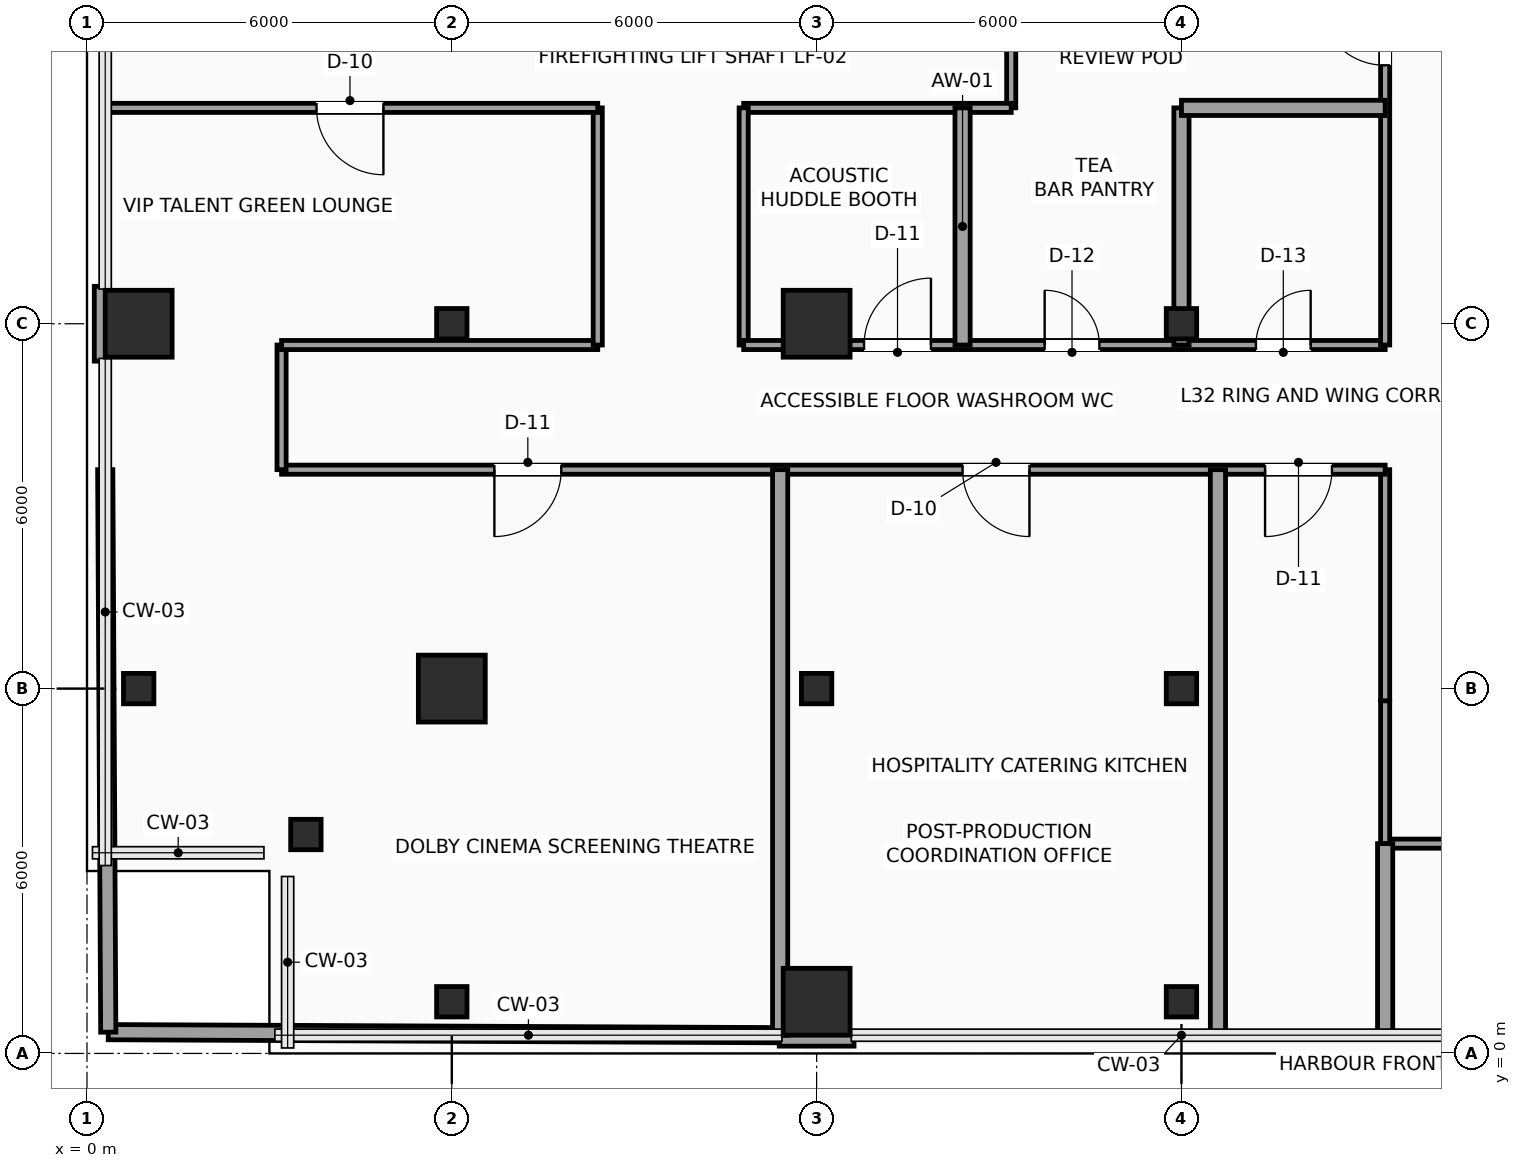
"""IFC4 building model, lengths in metres.
Left out: names, types, materials, properties, quantities, classifications, styles, units other than length and angle.
Written with IfcOpenShell. Run it as: python <this file> out.ifc"""

import sys

from ifc_helpers import new_model, si_unit, direction, frame, frame_2d, origin, origin_2d, place, context, subcontext, project, spatial, rectangle, hollow_rectangle, extrude, element, fill, save


model = new_model("IFC4")
c1 = context("Model", 3, precision=1e-05, world=origin(), true_north=direction((0.0, 1.0)))
c2 = subcontext(c1, "Body", "Model", "MODEL_VIEW")
j1 = project(units=[si_unit("LENGTHUNIT", "METRE"), si_unit("PLANEANGLEUNIT", "RADIAN")], contexts=[c1])
p1 = place(None, origin())
s1 = spatial("IfcSite", under=j1, at=p1, CompositionType="ELEMENT")
p2 = place(p1, origin())
s2 = spatial("IfcBuilding", under=s1, at=p2, CompositionType="ELEMENT")
p3 = place(p2, frame((0.0, 0.0, 134.4)))
s3 = spatial("IfcBuildingStorey", under=s2, at=p3, CompositionType="ELEMENT", Elevation=134.4)
for number, where, z_axis, x_axis in (
    (1, (3.6, 3.6, 0.0), (0.0, 0.0, 1.0), (1.0, 0.0, 0.0)),
    (2, (0.85, 6.0, 0.0), (0.0, 0.0, 1.0), (1.0, 0.0, 0.0)),
):
    element("IfcColumn", number, at=place(p3, frame(where, z_axis=z_axis, x_axis=x_axis)), inside=s3, PredefinedType="COLUMN", context=c2, shape_type="SweptSolid", body=[
        extrude(hollow_rectangle(XDim=0.5, YDim=0.5, WallThickness=0.025, InnerFilletRadius=0.025, OuterFilletRadius=0.04, at=origin_2d()), origin(), (0.0, 0.0, 1.0), 3.75),
    ])
p4 = place(p3, frame((0.85, 12.0, 0.0), z_axis=(0.0, 0.0, 1.0), x_axis=(1.0, 0.0, 0.0)))
e3 = element("IfcColumn", 3, at=p4, inside=s3, PredefinedType="COLUMN", context=c2, shape_type="SweptSolid", body=[
    extrude(rectangle(XDim=1.1, YDim=1.1, at=origin_2d()), origin(), (0.0, 0.0, 1.0), 3.75),
])
p5 = place(p3, frame((6.0, 0.85, 0.0), z_axis=(0.0, 0.0, 1.0), x_axis=(1.0, 0.0, 0.0)))
e4 = element("IfcColumn", 4, at=p5, inside=s3, PredefinedType="COLUMN", context=c2, shape_type="SweptSolid", body=[
    extrude(hollow_rectangle(XDim=0.5, YDim=0.5, WallThickness=0.025, InnerFilletRadius=0.025, OuterFilletRadius=0.04, at=origin_2d()), origin(), (0.0, 0.0, 1.0), 3.75),
])
p6 = place(p3, frame((6.0, 6.0, 0.0), z_axis=(0.0, 0.0, 1.0), x_axis=(1.0, 0.0, 0.0)))
e5 = element("IfcColumn", 5, at=p6, inside=s3, PredefinedType="COLUMN", context=c2, shape_type="SweptSolid", body=[
    extrude(rectangle(XDim=1.1, YDim=1.1, at=origin_2d()), origin(), (0.0, 0.0, 1.0), 3.75),
])
p7 = place(p3, frame((6.0, 12.0, 0.0), z_axis=(0.0, 0.0, 1.0), x_axis=(1.0, 0.0, 0.0)))
e6 = element("IfcColumn", 6, at=p7, inside=s3, PredefinedType="COLUMN", context=c2, shape_type="SweptSolid", body=[
    extrude(hollow_rectangle(XDim=0.5, YDim=0.5, WallThickness=0.025, InnerFilletRadius=0.025, OuterFilletRadius=0.04, at=origin_2d()), origin(), (0.0, 0.0, 1.0), 3.75),
])
p8 = place(p3, frame((12.0, 0.85, 0.0), z_axis=(0.0, 0.0, 1.0), x_axis=(1.0, 0.0, 0.0)))
e7 = element("IfcColumn", 7, at=p8, inside=s3, PredefinedType="COLUMN", context=c2, shape_type="SweptSolid", body=[
    extrude(rectangle(XDim=1.1, YDim=1.1, at=origin_2d()), origin(), (0.0, 0.0, 1.0), 3.75),
])
p9 = place(p3, frame((12.0, 6.0, 0.0), z_axis=(0.0, 0.0, 1.0), x_axis=(1.0, 0.0, 0.0)))
e8 = element("IfcColumn", 8, at=p9, inside=s3, PredefinedType="COLUMN", context=c2, shape_type="SweptSolid", body=[
    extrude(hollow_rectangle(XDim=0.5, YDim=0.5, WallThickness=0.025, InnerFilletRadius=0.025, OuterFilletRadius=0.04, at=origin_2d()), origin(), (0.0, 0.0, 1.0), 3.75),
])
p10 = place(p3, frame((12.0, 12.0, 0.0), z_axis=(0.0, 0.0, 1.0), x_axis=(1.0, 0.0, 0.0)))
e9 = element("IfcColumn", 9, at=p10, inside=s3, PredefinedType="COLUMN", context=c2, shape_type="SweptSolid", body=[
    extrude(rectangle(XDim=1.1, YDim=1.1, at=origin_2d()), origin(), (0.0, 0.0, 1.0), 3.75),
])
for number, where, z_axis, x_axis in (
    (10, (18.0, 0.85, 0.0), (0.0, 0.0, 1.0), (1.0, 0.0, 0.0)),
    (11, (18.0, 6.0, 0.0), (0.0, 0.0, 1.0), (1.0, 0.0, 0.0)),
    (12, (18.0, 12.0, 0.0), (0.0, 0.0, 1.0), (1.0, 0.0, 0.0)),
):
    element("IfcColumn", number, at=place(p3, frame(where, z_axis=z_axis, x_axis=x_axis)), inside=s3, PredefinedType="COLUMN", context=c2, shape_type="SweptSolid", body=[
        extrude(hollow_rectangle(XDim=0.5, YDim=0.5, WallThickness=0.025, InnerFilletRadius=0.025, OuterFilletRadius=0.04, at=origin_2d()), origin(), (0.0, 0.0, 1.0), 3.75),
    ])
for number, where, z_axis, x_axis in (
    (13, (0.24, 11.385, 0.0), (0.0, 0.0, 1.0), (0.0, 1.0, 0.0)),
    (14, (12.615, 0.24, 0.0), (0.0, 0.0, 1.0), (-1.0, 0.0, 0.0)),
):
    element("IfcWall", number, at=place(p3, frame(where, z_axis=z_axis, x_axis=x_axis)), inside=s3, PredefinedType="SOLIDWALL", context=c2, shape_type="SweptSolid", body=[
        extrude(rectangle(XDim=1.23, YDim=0.24, at=frame_2d((0.615, 0.0))), origin(), (0.0, 0.0, 1.0), 3.525),
    ])
p11 = place(p3, frame((23.95, 3.45, 0.0), z_axis=(0.0, 0.0, 1.0), x_axis=(-1.0, 0.0, 0.0)))
e15 = element("IfcWall", 15, at=p11, inside=s3, PredefinedType="PARTITIONING", context=c2, shape_type="SweptSolid", body=[
    extrude(rectangle(XDim=2.6, YDim=0.15, at=frame_2d((1.3, 0.0))), origin(), (0.0, 0.0, 1.0), 3.067),
])
p12 = place(p3, frame((21.35, 3.45, 0.0), z_axis=(0.0, 0.0, 1.0), x_axis=(0.0, 1.0, 0.0)))
e16 = element("IfcWall", 16, at=p12, inside=s3, PredefinedType="PARTITIONING", context=c2, shape_type="SweptSolid", body=[
    extrude(rectangle(XDim=2.35, YDim=0.15, at=frame_2d((1.175, 0.0))), origin(), (0.0, 0.0, 1.0), 3.525),
])
p13 = place(p3, frame((21.35, 5.8, 0.0), z_axis=(0.0, 0.0, 1.0), x_axis=(0.0, 1.0, 0.0)))
e17 = element("IfcWall", 17, at=p13, inside=s3, PredefinedType="PARTITIONING", context=c2, shape_type="SweptSolid", body=[
    extrude(rectangle(XDim=3.8, YDim=0.15, at=frame_2d((1.9, 0.0))), origin(), (0.0, 0.0, 1.0), 3.525),
])
p14 = place(p3, frame((21.35, 9.6, 0.0), z_axis=(0.0, 0.0, 1.0), x_axis=(-1.0, 0.0, 0.0)))
e18 = element("IfcWall", 18, at=p14, inside=s3, PredefinedType="PARTITIONING", context=c2, shape_type="SweptSolid", body=[
    extrude(rectangle(XDim=18.15, YDim=0.15, at=frame_2d((9.075, 0.0))), origin(), (0.0, 0.0, 1.0), 3.525),
])
p15 = place(p14, frame((13.55, 0.0, 0.0)))
e19 = element("IfcOpeningElement", 19, at=p15, cuts=e18, PredefinedType="OPENING", context=c2, shape_type="SweptSolid", body=[
    extrude(rectangle(XDim=1.1, YDim=2.25, at=frame_2d((0.55, 1.125))), frame((0.0, 0.085, 0.0), z_axis=(0.0, -1.0, 0.0), x_axis=(1.0, 0.0, 0.0)), (0.0, 0.0, 1.0), 0.17),
])
p16 = place(p14, frame((5.85, 0.0, 0.0)))
e20 = element("IfcOpeningElement", 20, at=p16, cuts=e18, PredefinedType="OPENING", context=c2, shape_type="SweptSolid", body=[
    extrude(rectangle(XDim=1.1, YDim=2.25, at=frame_2d((0.55, 1.125))), frame((0.0, 0.085, 0.0), z_axis=(0.0, -1.0, 0.0), x_axis=(1.0, 0.0, 0.0)), (0.0, 0.0, 1.0), 0.17),
])
p17 = place(p14, frame((0.875, 0.0, 0.0)))
e21 = element("IfcOpeningElement", 21, at=p17, cuts=e18, PredefinedType="OPENING", context=c2, shape_type="SweptSolid", body=[
    extrude(rectangle(XDim=1.1, YDim=2.25, at=frame_2d((0.55, 1.125))), frame((0.0, 0.085, 0.0), z_axis=(0.0, -1.0, 0.0), x_axis=(1.0, 0.0, 0.0)), (0.0, 0.0, 1.0), 0.17),
])
p18 = place(p3, frame((3.2, 9.6, 0.0), z_axis=(0.0, 0.0, 1.0), x_axis=(0.0, 1.0, 0.0)))
e22 = element("IfcWall", 22, at=p18, inside=s3, PredefinedType="PARTITIONING", context=c2, shape_type="SweptSolid", body=[
    extrude(rectangle(XDim=2.05, YDim=0.15, at=frame_2d((1.025, 0.0))), origin(), (0.0, 0.0, 1.0), 3.525),
])
p19 = place(p3, frame((3.2, 11.65, 0.0), z_axis=(0.0, 0.0, 1.0), x_axis=(1.0, 0.0, 0.0)))
e23 = element("IfcWall", 23, at=p19, inside=s3, PredefinedType="PARTITIONING", context=c2, shape_type="SweptSolid", body=[
    extrude(rectangle(XDim=5.2, YDim=0.15, at=frame_2d((2.6, 0.0))), origin(), (0.0, 0.0, 1.0), 3.525),
])
p20 = place(p3, frame((8.4, 11.65, 0.0), z_axis=(0.0, 0.0, 1.0), x_axis=(0.0, 1.0, 0.0)))
e24 = element("IfcWall", 24, at=p20, inside=s3, PredefinedType="PARTITIONING", context=c2, shape_type="SweptSolid", body=[
    extrude(rectangle(XDim=3.9, YDim=0.15, at=frame_2d((1.95, 0.0))), origin(), (0.0, 0.0, 1.0), 3.525),
])
p21 = place(p3, frame((8.4, 15.55, 0.0), z_axis=(0.0, 0.0, 1.0), x_axis=(-1.0, 0.0, 0.0)))
e25 = element("IfcWall", 25, at=p21, inside=s3, PredefinedType="PARTITIONING", context=c2, shape_type="SweptSolid", body=[
    extrude(rectangle(XDim=8.1, YDim=0.15, at=frame_2d((4.05, 0.0))), origin(), (0.0, 0.0, 1.0), 3.525),
])
p22 = place(p21, frame((3.525, 0.0, 0.0)))
e26 = element("IfcOpeningElement", 26, at=p22, cuts=e25, PredefinedType="OPENING", context=c2, shape_type="SweptSolid", body=[
    extrude(rectangle(XDim=1.1, YDim=2.25, at=frame_2d((0.55, 1.125))), frame((0.0, 0.085, 0.0), z_axis=(0.0, -1.0, 0.0), x_axis=(1.0, 0.0, 0.0)), (0.0, 0.0, 1.0), 0.17),
])
p23 = place(p3, frame((15.2, 17.95, 0.0), z_axis=(0.0, 0.0, 1.0), x_axis=(0.0, -1.0, 0.0)))
e27 = element("IfcWall", 27, at=p23, inside=s3, PredefinedType="PARTITIONING", context=c2, shape_type="SweptSolid", body=[
    extrude(rectangle(XDim=2.4, YDim=0.15, at=frame_2d((1.2, 0.0))), origin(), (0.0, 0.0, 1.0), 3.525),
])
p24 = place(p3, frame((15.2, 15.55, 0.0), z_axis=(0.0, 0.0, 1.0), x_axis=(-1.0, 0.0, 0.0)))
e28 = element("IfcWall", 28, at=p24, inside=s3, PredefinedType="PARTITIONING", context=c2, shape_type="SweptSolid", body=[
    extrude(rectangle(XDim=4.4, YDim=0.15, at=frame_2d((2.2, 0.0))), origin(), (0.0, 0.0, 1.0), 3.525),
])
p25 = place(p3, frame((10.8, 15.55, 0.0), z_axis=(0.0, 0.0, 1.0), x_axis=(0.0, -1.0, 0.0)))
e29 = element("IfcWall", 29, at=p25, inside=s3, PredefinedType="PARTITIONING", context=c2, shape_type="SweptSolid", body=[
    extrude(rectangle(XDim=3.9, YDim=0.15, at=frame_2d((1.95, 0.0))), origin(), (0.0, 0.0, 1.0), 3.525),
])
p26 = place(p3, frame((10.8, 11.65, 0.0), z_axis=(0.0, 0.0, 1.0), x_axis=(1.0, 0.0, 0.0)))
e30 = element("IfcWall", 30, at=p26, inside=s3, PredefinedType="PARTITIONING", context=c2, shape_type="SweptSolid", body=[
    extrude(rectangle(XDim=10.55, YDim=0.15, at=frame_2d((5.275, 0.0))), origin(), (0.0, 0.0, 1.0), 3.525),
])
p27 = place(p26, frame((1.98, 0.0, 0.0)))
e31 = element("IfcOpeningElement", 31, at=p27, cuts=e30, PredefinedType="OPENING", context=c2, shape_type="SweptSolid", body=[
    extrude(rectangle(XDim=1.1, YDim=2.25, at=frame_2d((0.55, 1.125))), frame((0.0, 0.085, 0.0), z_axis=(0.0, -1.0, 0.0), x_axis=(1.0, 0.0, 0.0)), (0.0, 0.0, 1.0), 0.17),
])
p28 = place(p26, frame((4.95, 0.0, 0.0)))
e32 = element("IfcOpeningElement", 32, at=p28, cuts=e30, PredefinedType="OPENING", context=c2, shape_type="SweptSolid", body=[
    extrude(rectangle(XDim=0.9, YDim=2.1, at=frame_2d((0.45, 1.05))), frame((0.0, 0.085, 0.0), z_axis=(0.0, -1.0, 0.0), x_axis=(1.0, 0.0, 0.0)), (0.0, 0.0, 1.0), 0.17),
])
p29 = place(p26, frame((8.425, 0.0, 0.0)))
e33 = element("IfcOpeningElement", 33, at=p29, cuts=e30, PredefinedType="OPENING", context=c2, shape_type="SweptSolid", body=[
    extrude(rectangle(XDim=0.9, YDim=2.1, at=frame_2d((0.45, 1.05))), frame((0.0, 0.085, 0.0), z_axis=(0.0, -1.0, 0.0), x_axis=(1.0, 0.0, 0.0)), (0.0, 0.0, 1.0), 0.17),
])
p30 = place(p3, frame((21.35, 11.65, 0.0), z_axis=(0.0, 0.0, 1.0), x_axis=(0.0, 1.0, 0.0)))
e34 = element("IfcWall", 34, at=p30, inside=s3, PredefinedType="PARTITIONING", context=c2, shape_type="SweptSolid", body=[
    extrude(rectangle(XDim=18.6, YDim=0.15, at=frame_2d((9.3, 0.0))), origin(), (0.0, 0.0, 1.0), 3.525),
])
p31 = place(p30, frame((7.2, 0.0, 0.0)))
e35 = element("IfcOpeningElement", 35, at=p31, cuts=e34, PredefinedType="OPENING", context=c2, shape_type="SweptSolid", body=[
    extrude(rectangle(XDim=0.95, YDim=2.15, at=frame_2d((0.475, 1.075))), frame((0.0, 0.085, 0.0), z_axis=(0.0, -1.0, 0.0), x_axis=(1.0, 0.0, 0.0)), (0.0, 0.0, 1.0), 0.17),
])
p32 = place(p30, frame((10.45, 0.0, 0.0)))
e36 = element("IfcOpeningElement", 36, at=p32, cuts=e34, PredefinedType="OPENING", context=c2, shape_type="SweptSolid", body=[
    extrude(rectangle(XDim=0.9, YDim=2.1, at=frame_2d((0.45, 1.05))), frame((0.0, 0.085, 0.0), z_axis=(0.0, -1.0, 0.0), x_axis=(1.0, 0.0, 0.0)), (0.0, 0.0, 1.0), 0.17),
])
p33 = place(p30, frame((13.9, 0.0, 0.0)))
e37 = element("IfcOpeningElement", 37, at=p33, cuts=e34, PredefinedType="OPENING", context=c2, shape_type="SweptSolid", body=[
    extrude(rectangle(XDim=0.95, YDim=2.15, at=frame_2d((0.475, 1.075))), frame((0.0, 0.085, 0.0), z_axis=(0.0, -1.0, 0.0), x_axis=(1.0, 0.0, 0.0)), (0.0, 0.0, 1.0), 0.17),
])
p34 = place(p30, frame((4.6, 0.0, 0.0)))
e38 = element("IfcOpeningElement", 38, at=p34, cuts=e34, PredefinedType="OPENING", context=c2, shape_type="SweptSolid", body=[
    extrude(rectangle(XDim=1.1, YDim=2.25, at=frame_2d((0.55, 1.125))), frame((0.0, 0.085, 0.0), z_axis=(0.0, -1.0, 0.0), x_axis=(1.0, 0.0, 0.0)), (0.0, 0.0, 1.0), 0.17),
])
p35 = place(p3, frame((14.4, 11.65, 0.0), z_axis=(0.0, 0.0, 1.0), x_axis=(0.0, 1.0, 0.0)))
e39 = element("IfcWall", 39, at=p35, inside=s3, PredefinedType="PARTITIONING", context=c2, shape_type="SweptSolid", body=[
    extrude(rectangle(XDim=3.9, YDim=0.25, at=frame_2d((1.95, 0.0))), origin(), (0.0, 0.0, 1.0), 3.525),
])
p36 = place(p3, frame((18.0, 11.65, 0.0), z_axis=(0.0, 0.0, 1.0), x_axis=(0.0, 1.0, 0.0)))
e40 = element("IfcWall", 40, at=p36, inside=s3, PredefinedType="PARTITIONING", context=c2, shape_type="SweptSolid", body=[
    extrude(rectangle(XDim=3.9, YDim=0.25, at=frame_2d((1.95, 0.0))), origin(), (0.0, 0.0, 1.0), 3.017),
])
p37 = place(p3, frame((18.0, 15.55, 0.0), z_axis=(0.0, 0.0, 1.0), x_axis=(1.0, 0.0, 0.0)))
e41 = element("IfcWall", 41, at=p37, inside=s3, PredefinedType="PARTITIONING", context=c2, shape_type="SweptSolid", body=[
    extrude(rectangle(XDim=3.35, YDim=0.25, at=frame_2d((1.675, 0.0))), origin(), (0.0, 0.0, 1.0), 3.525),
])
p38 = place(p3, frame((21.35, 0.3, 0.0), z_axis=(0.0, 0.0, 1.0), x_axis=(0.0, 1.0, 0.0)))
e42 = element("IfcWall", 42, at=p38, inside=s3, PredefinedType="PARTITIONING", context=c2, shape_type="SweptSolid", body=[
    extrude(rectangle(XDim=3.15, YDim=0.25, at=frame_2d((1.575, 0.0))), origin(), (0.0, 0.0, 1.0), 3.525),
])
p39 = place(p3, frame((0.35, 0.35, 0.0), z_axis=(0.0, 0.0, 1.0), x_axis=(0.999989714785, -0.004535451924, 0.0)))
e43 = element("IfcWall", 43, at=p39, inside=s3, PredefinedType="PARTITIONING", context=c2, shape_type="SweptSolid", body=[
    extrude(rectangle(XDim=11.035, YDim=0.25, at=frame_2d((5.518, 0.0))), origin(), (0.0, 0.0, 1.0), 3.525),
])
p40 = place(p3, frame((0.35, 0.35, 0.0), z_axis=(0.0, 0.0, 1.0), x_axis=(-0.005410604923, 0.99998536257, 0.0)))
e44 = element("IfcWall", 44, at=p40, inside=s3, PredefinedType="PARTITIONING", context=c2, shape_type="SweptSolid", body=[
    extrude(rectangle(XDim=9.25, YDim=0.25, at=frame_2d((4.625, 0.0))), origin(), (0.0, 0.0, 1.0), 3.525),
])
for number, where, z_axis, x_axis in (
    (45, (11.4, 0.3, 0.0), (0.0, 0.0, 1.0), (0.0, 1.0, 0.0)),
    (46, (18.6, 0.3, 0.0), (0.0, 0.0, 1.0), (0.0, 1.0, 0.0)),
):
    element("IfcWall", number, at=place(p3, frame(where, z_axis=z_axis, x_axis=x_axis)), inside=s3, PredefinedType="PARTITIONING", context=c2, shape_type="SweptSolid", body=[
        extrude(rectangle(XDim=9.3, YDim=0.25, at=frame_2d((4.65, 0.0))), origin(), (0.0, 0.0, 1.0), 3.525),
    ])
p41 = place(p15, origin())
e47 = element("IfcDoor", 47, at=p41, inside=s3, OperationType="SINGLE_SWING_RIGHT", PredefinedType="DOOR", context=c2, shape_type="SweptSolid", body=[
    extrude(rectangle(XDim=1.1, YDim=2.25, at=frame_2d((0.55, 1.125))), frame((0.0, 0.025, 0.0), z_axis=(0.0, -1.0, 0.0), x_axis=(1.0, 0.0, 0.0)), (0.0, 0.0, 1.0), 0.05),
])
fill(e19, e47)
p42 = place(p16, origin())
e48 = element("IfcDoor", 48, at=p42, inside=s3, OperationType="SINGLE_SWING_LEFT", PredefinedType="DOOR", context=c2, shape_type="SweptSolid", body=[
    extrude(rectangle(XDim=1.1, YDim=2.25, at=frame_2d((0.55, 1.125))), frame((0.0, 0.025, 0.0), z_axis=(0.0, -1.0, 0.0), x_axis=(1.0, 0.0, 0.0)), (0.0, 0.0, 1.0), 0.05),
])
fill(e20, e48)
p43 = place(p17, origin())
e49 = element("IfcDoor", 49, at=p43, inside=s3, OperationType="SINGLE_SWING_RIGHT", PredefinedType="DOOR", context=c2, shape_type="SweptSolid", body=[
    extrude(rectangle(XDim=1.1, YDim=2.25, at=frame_2d((0.55, 1.125))), frame((0.0, 0.025, 0.0), z_axis=(0.0, -1.0, 0.0), x_axis=(1.0, 0.0, 0.0)), (0.0, 0.0, 1.0), 0.05),
])
fill(e21, e49)
p44 = place(p22, origin())
e50 = element("IfcDoor", 50, at=p44, inside=s3, OperationType="SINGLE_SWING_LEFT", PredefinedType="DOOR", context=c2, shape_type="SweptSolid", body=[
    extrude(rectangle(XDim=1.1, YDim=2.25, at=frame_2d((0.55, 1.125))), frame((0.0, 0.025, 0.0), z_axis=(0.0, -1.0, 0.0), x_axis=(1.0, 0.0, 0.0)), (0.0, 0.0, 1.0), 0.05),
])
fill(e26, e50)
p45 = place(p27, origin())
e51 = element("IfcDoor", 51, at=p45, inside=s3, OperationType="SINGLE_SWING_RIGHT", PredefinedType="DOOR", context=c2, shape_type="SweptSolid", body=[
    extrude(rectangle(XDim=1.1, YDim=2.25, at=frame_2d((0.55, 1.125))), frame((0.0, 0.025, 0.0), z_axis=(0.0, -1.0, 0.0), x_axis=(1.0, 0.0, 0.0)), (0.0, 0.0, 1.0), 0.05),
])
fill(e31, e51)
p46 = place(p28, origin())
e52 = element("IfcDoor", 52, at=p46, inside=s3, OperationType="SINGLE_SWING_LEFT", PredefinedType="DOOR", context=c2, shape_type="SweptSolid", body=[
    extrude(rectangle(XDim=0.9, YDim=2.1, at=frame_2d((0.45, 1.05))), frame((0.0, 0.025, 0.0), z_axis=(0.0, -1.0, 0.0), x_axis=(1.0, 0.0, 0.0)), (0.0, 0.0, 1.0), 0.05),
])
fill(e32, e52)
p47 = place(p29, origin())
e53 = element("IfcDoor", 53, at=p47, inside=s3, OperationType="SINGLE_SWING_RIGHT", PredefinedType="DOOR", context=c2, shape_type="SweptSolid", body=[
    extrude(rectangle(XDim=0.9, YDim=2.1, at=frame_2d((0.45, 1.05))), frame((0.0, 0.025, 0.0), z_axis=(0.0, -1.0, 0.0), x_axis=(1.0, 0.0, 0.0)), (0.0, 0.0, 1.0), 0.05),
])
fill(e33, e53)
p48 = place(p34, origin())
e54 = element("IfcDoor", 54, at=p48, inside=s3, OperationType="SINGLE_SWING_RIGHT", PredefinedType="DOOR", context=c2, shape_type="SweptSolid", body=[
    extrude(rectangle(XDim=1.1, YDim=2.25, at=frame_2d((0.55, 1.125))), frame((0.0, 0.025, 0.0), z_axis=(0.0, -1.0, 0.0), x_axis=(1.0, 0.0, 0.0)), (0.0, 0.0, 1.0), 0.05),
])
fill(e38, e54)
save(model, sys.argv[1])
